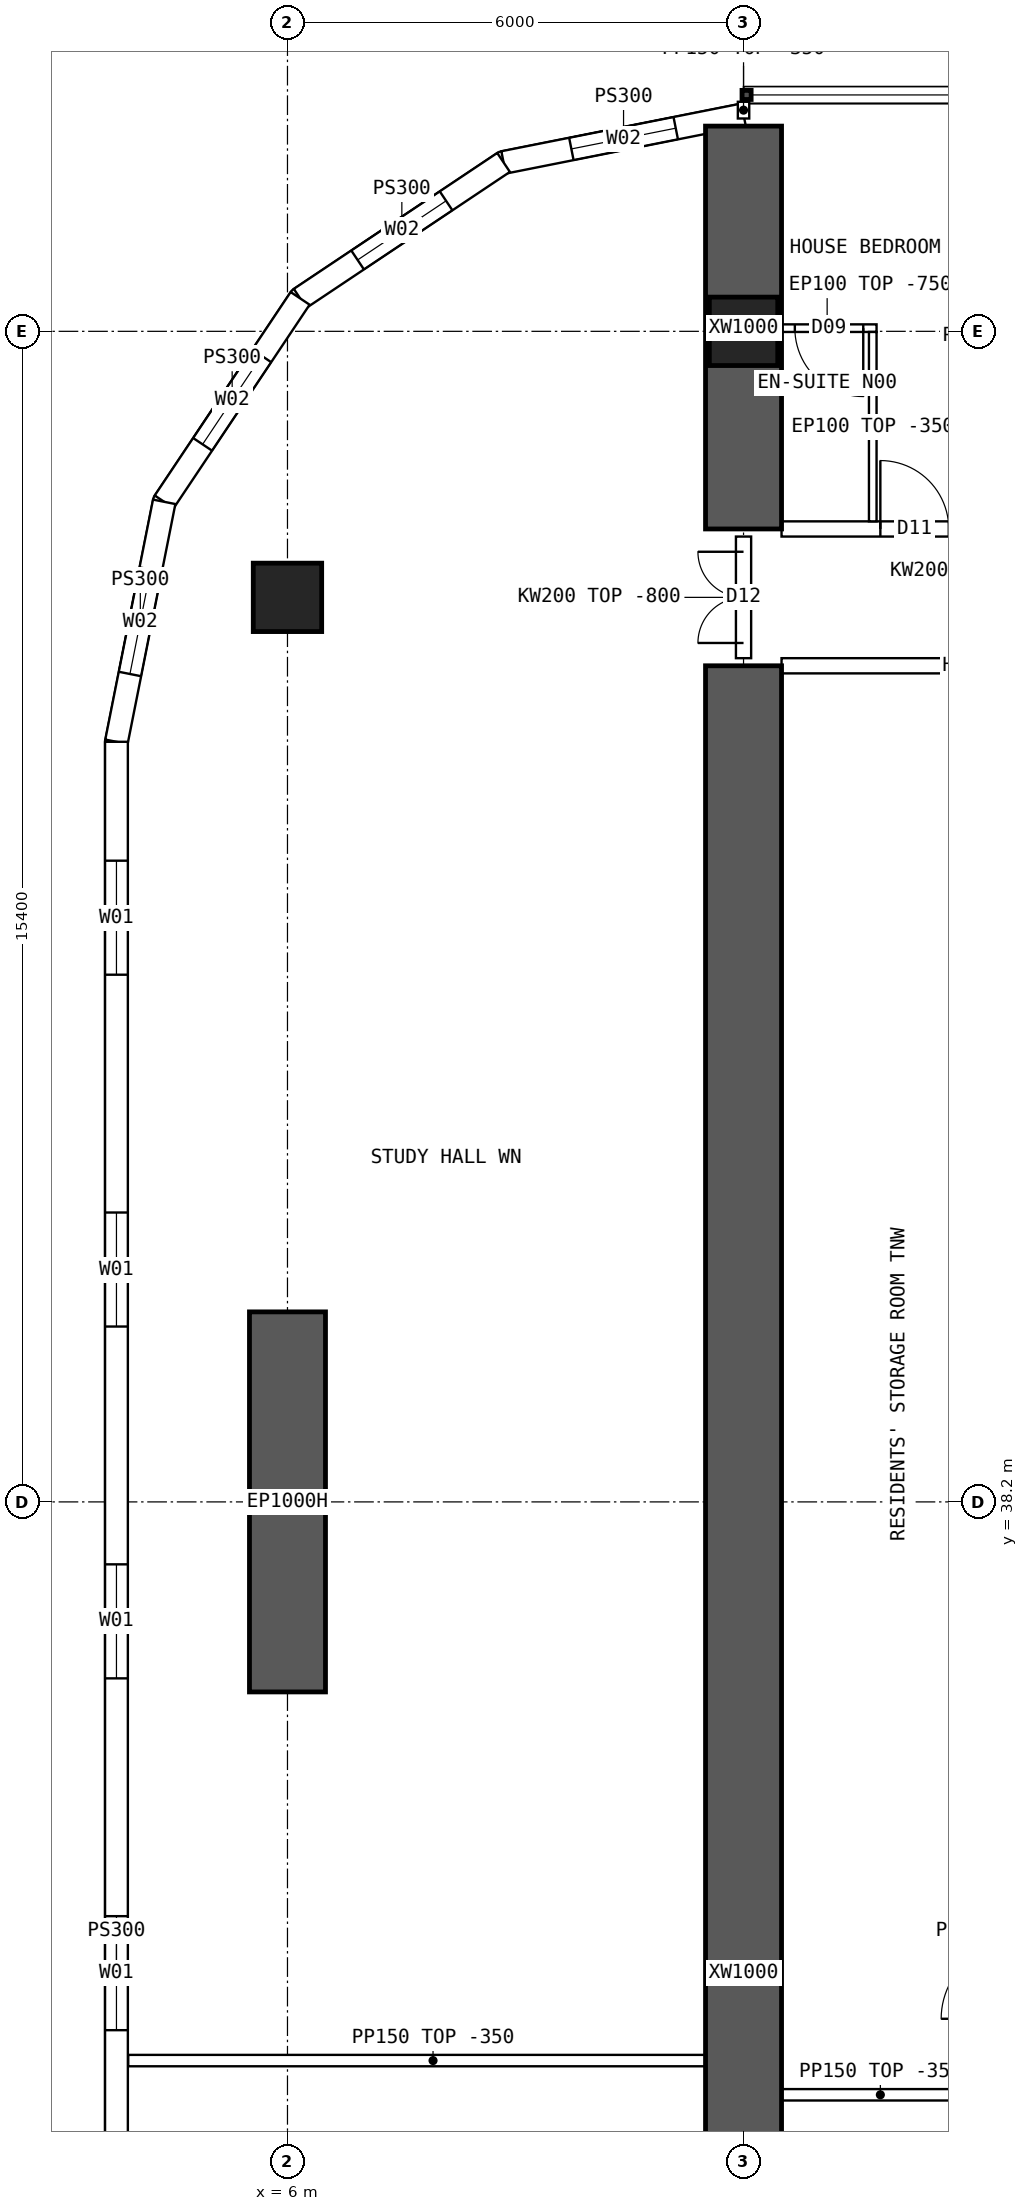
"""IFC4 building model, lengths in metres.
Left out: names, types, materials, properties, quantities, classifications, styles, units other than length and angle.
Written with IfcOpenShell. Run it as: python <this file> out.ifc"""

import sys

from ifc_helpers import new_model, si_unit, direction, frame, frame_2d, origin, origin_2d, place, context, subcontext, project, spatial, polyline, rectangle, hollow_rectangle, outline, extrude, element, fill, save


model = new_model("IFC4")
c1 = context("Model", 3, precision=1e-05, world=origin(), true_north=direction((0.0, 1.0)))
c2 = subcontext(c1, "Body", "Model", "MODEL_VIEW")
j1 = project(units=[si_unit("LENGTHUNIT", "METRE"), si_unit("PLANEANGLEUNIT", "RADIAN")], contexts=[c1])
p1 = place(None, origin())
s1 = spatial("IfcSite", under=j1, at=p1, CompositionType="ELEMENT")
p2 = place(p1, origin())
s2 = spatial("IfcBuilding", under=s1, at=p2, CompositionType="ELEMENT")
p3 = place(p2, frame((0.0, 0.0, 65.2)))
s3 = spatial("IfcBuildingStorey", under=s2, at=p3, CompositionType="ELEMENT", Elevation=65.2)
for number, where, z_axis, x_axis in (
    (1, (12.0, 53.6, 0.0), (0.0, 0.0, 1.0), (1.0, 0.0, 0.0)),
    (2, (6.0, 50.1, 0.0), (0.0, 0.0, 1.0), (1.0, 0.0, 0.0)),
):
    element("IfcColumn", number, at=place(p3, frame(where, z_axis=z_axis, x_axis=x_axis)), inside=s3, PredefinedType="COLUMN", context=c2, shape_type="SweptSolid", body=[
        extrude(hollow_rectangle(XDim=0.9, YDim=0.9, WallThickness=0.09, at=origin_2d()), origin(), (0.0, 0.0, 1.0), 3.75),
    ])
p4 = place(p3, frame((6.0, 35.7, 0.0), z_axis=(0.0, 0.0, 1.0), x_axis=(0.0, 1.0, 0.0)))
e3 = element("IfcWall", 3, at=p4, inside=s3, PredefinedType="SHEAR", context=c2, shape_type="SweptSolid", body=[
    extrude(rectangle(XDim=5.0, YDim=1.0, at=frame_2d((2.5, 0.0))), origin(), (0.0, 0.0, 1.0), 3.75),
])
p5 = place(p3, frame((12.0, 51.0, 0.0), z_axis=(0.0, 0.0, 1.0), x_axis=(0.0, 1.0, 0.0)))
e4 = element("IfcWall", 4, at=p5, inside=s3, PredefinedType="SHEAR", context=c2, shape_type="SweptSolid", body=[
    extrude(rectangle(XDim=5.3, YDim=1.0, at=frame_2d((2.65, 0.0))), origin(), (0.0, 0.0, 1.0), 3.75),
])
p6 = place(p3, frame((12.0, 14.8, 0.0), z_axis=(0.0, 0.0, 1.0), x_axis=(0.0, 1.0, 0.0)))
e5 = element("IfcWall", 5, at=p6, inside=s3, PredefinedType="SHEAR", context=c2, shape_type="SweptSolid", body=[
    extrude(rectangle(XDim=34.4, YDim=1.0, at=frame_2d((17.2, 0.0))), origin(), (0.0, 0.0, 1.0), 3.75),
])
p7 = place(p3, frame((3.75, 48.2, 0.0), z_axis=(0.0, 0.0, 1.0), x_axis=(0.0, -1.0, 0.0)))
e6 = element("IfcWall", 6, at=p7, inside=s3, PredefinedType="SOLIDWALL", context=c2, shape_type="SweptSolid", body=[
    extrude(outline(polyline([(-0.015, -0.15), (32.415, -0.15), (32.385, 0.15), (0.015, 0.15), (-0.015, -0.15)])), origin(), (0.0, 0.0, 1.0), 3.4),
])
p8 = place(p7, frame((1.564, 0.0, 0.9)))
e7 = element("IfcOpeningElement", 7, at=p8, cuts=e6, PredefinedType="OPENING", context=c2, shape_type="SweptSolid", body=[
    extrude(rectangle(XDim=1.5, YDim=2.0, at=frame_2d((0.75, 1.0))), frame((0.0, 0.16, 0.0), z_axis=(0.0, -1.0, 0.0), x_axis=(1.0, 0.0, 0.0)), (0.0, 0.0, 1.0), 0.32),
])
p9 = place(p7, frame((6.193, 0.0, 0.9)))
e8 = element("IfcOpeningElement", 8, at=p9, cuts=e6, PredefinedType="OPENING", context=c2, shape_type="SweptSolid", body=[
    extrude(rectangle(XDim=1.5, YDim=2.0, at=frame_2d((0.75, 1.0))), frame((0.0, 0.16, 0.0), z_axis=(0.0, -1.0, 0.0), x_axis=(1.0, 0.0, 0.0)), (0.0, 0.0, 1.0), 0.32),
])
p10 = place(p7, frame((10.822, 0.0, 0.9)))
e9 = element("IfcOpeningElement", 9, at=p10, cuts=e6, PredefinedType="OPENING", context=c2, shape_type="SweptSolid", body=[
    extrude(rectangle(XDim=1.5, YDim=2.0, at=frame_2d((0.75, 1.0))), frame((0.0, 0.16, 0.0), z_axis=(0.0, -1.0, 0.0), x_axis=(1.0, 0.0, 0.0)), (0.0, 0.0, 1.0), 0.32),
])
p11 = place(p7, frame((15.45, 0.0, 0.9)))
e10 = element("IfcOpeningElement", 10, at=p11, cuts=e6, PredefinedType="OPENING", context=c2, shape_type="SweptSolid", body=[
    extrude(rectangle(XDim=1.5, YDim=2.0, at=frame_2d((0.75, 1.0))), frame((0.0, 0.16, 0.0), z_axis=(0.0, -1.0, 0.0), x_axis=(1.0, 0.0, 0.0)), (0.0, 0.0, 1.0), 0.32),
])
p12 = place(p7, frame((20.079, 0.0, 0.9)))
e11 = element("IfcOpeningElement", 11, at=p12, cuts=e6, PredefinedType="OPENING", context=c2, shape_type="SweptSolid", body=[
    extrude(rectangle(XDim=1.5, YDim=2.0, at=frame_2d((0.75, 1.0))), frame((0.0, 0.16, 0.0), z_axis=(0.0, -1.0, 0.0), x_axis=(1.0, 0.0, 0.0)), (0.0, 0.0, 1.0), 0.32),
])
p13 = place(p7, frame((24.707, 0.0, 0.9)))
e12 = element("IfcOpeningElement", 12, at=p13, cuts=e6, PredefinedType="OPENING", context=c2, shape_type="SweptSolid", body=[
    extrude(rectangle(XDim=1.5, YDim=2.0, at=frame_2d((0.75, 1.0))), frame((0.0, 0.16, 0.0), z_axis=(0.0, -1.0, 0.0), x_axis=(1.0, 0.0, 0.0)), (0.0, 0.0, 1.0), 0.32),
])
p14 = place(p7, frame((29.336, 0.0, 0.9)))
e13 = element("IfcOpeningElement", 13, at=p14, cuts=e6, PredefinedType="OPENING", context=c2, shape_type="SweptSolid", body=[
    extrude(rectangle(XDim=1.5, YDim=2.0, at=frame_2d((0.75, 1.0))), frame((0.0, 0.16, 0.0), z_axis=(0.0, -1.0, 0.0), x_axis=(1.0, 0.0, 0.0)), (0.0, 0.0, 1.0), 0.32),
])
p15 = place(p3, frame((12.0, 56.45, 0.0), z_axis=(0.0, 0.0, 1.0), x_axis=(-0.980787251524, -0.195080412259, 0.0)))
e14 = element("IfcWall", 14, at=p15, inside=s3, PredefinedType="SOLIDWALL", context=c2, shape_type="SweptSolid", body=[
    extrude(outline(polyline([(-0.03, -0.15), (3.249, -0.15), (3.189, 0.15), (0.03, 0.15), (-0.03, -0.15)])), origin(), (0.0, 0.0, 1.0), 3.4),
])
p16 = place(p15, frame((0.909, 0.0, 0.9)))
e15 = element("IfcOpeningElement", 15, at=p16, cuts=e14, PredefinedType="OPENING", context=c2, shape_type="SweptSolid", body=[
    extrude(rectangle(XDim=1.4, YDim=1.8, at=frame_2d((0.7, 0.9))), frame((0.0, 0.16, 0.0), z_axis=(0.0, -1.0, 0.0), x_axis=(1.0, 0.0, 0.0)), (0.0, 0.0, 1.0), 0.32),
])
p17 = place(p3, frame((8.843, 55.822, 0.0), z_axis=(0.0, 0.0, 1.0), x_axis=(-0.831478105043, -0.555557522525, 0.0)))
e16 = element("IfcWall", 16, at=p17, inside=s3, PredefinedType="SOLIDWALL", context=c2, shape_type="SweptSolid", body=[
    extrude(outline(polyline([(-0.03, -0.15), (3.249, -0.15), (3.189, 0.15), (0.03, 0.15), (-0.03, -0.15)])), origin(), (0.0, 0.0, 1.0), 3.4),
])
p18 = place(p17, frame((0.909, 0.0, 0.9)))
e17 = element("IfcOpeningElement", 17, at=p18, cuts=e16, PredefinedType="OPENING", context=c2, shape_type="SweptSolid", body=[
    extrude(rectangle(XDim=1.4, YDim=1.8, at=frame_2d((0.7, 0.9))), frame((0.0, 0.16, 0.0), z_axis=(0.0, -1.0, 0.0), x_axis=(1.0, 0.0, 0.0)), (0.0, 0.0, 1.0), 0.32),
])
p19 = place(p3, frame((6.167, 54.034, 0.0), z_axis=(0.0, 0.0, 1.0), x_axis=(-0.555609954424, -0.831443069936, 0.0)))
e18 = element("IfcWall", 18, at=p19, inside=s3, PredefinedType="SOLIDWALL", context=c2, shape_type="SweptSolid", body=[
    extrude(outline(polyline([(-0.03, -0.15), (3.249, -0.15), (3.189, 0.15), (0.03, 0.15), (-0.03, -0.15)])), origin(), (0.0, 0.0, 1.0), 3.4),
])
p20 = place(p19, frame((0.909, 0.0, 0.9)))
e19 = element("IfcOpeningElement", 19, at=p20, cuts=e18, PredefinedType="OPENING", context=c2, shape_type="SweptSolid", body=[
    extrude(rectangle(XDim=1.4, YDim=1.8, at=frame_2d((0.7, 0.9))), frame((0.0, 0.16, 0.0), z_axis=(0.0, -1.0, 0.0), x_axis=(1.0, 0.0, 0.0)), (0.0, 0.0, 1.0), 0.32),
])
p21 = place(p3, frame((4.378, 51.357, 0.0), z_axis=(0.0, 0.0, 1.0), x_axis=(-0.195065901187, -0.980790137692, 0.0)))
e20 = element("IfcWall", 20, at=p21, inside=s3, PredefinedType="SOLIDWALL", context=c2, shape_type="SweptSolid", body=[
    extrude(outline(polyline([(-0.03, -0.15), (3.234, -0.15), (3.204, 0.15), (0.03, 0.15), (-0.03, -0.15)])), origin(), (0.0, 0.0, 1.0), 3.4),
])
p22 = place(p21, frame((0.909, 0.0, 0.9)))
e21 = element("IfcOpeningElement", 21, at=p22, cuts=e20, PredefinedType="OPENING", context=c2, shape_type="SweptSolid", body=[
    extrude(rectangle(XDim=1.4, YDim=1.8, at=frame_2d((0.7, 0.9))), frame((0.0, 0.16, 0.0), z_axis=(0.0, -1.0, 0.0), x_axis=(1.0, 0.0, 0.0)), (0.0, 0.0, 1.0), 0.32),
])
p23 = place(p3, frame((12.5, 51.0, 0.0), z_axis=(0.0, 0.0, 1.0), x_axis=(1.0, 0.0, 0.0)))
e22 = element("IfcWall", 22, at=p23, inside=s3, PredefinedType="SOLIDWALL", context=c2, shape_type="SweptSolid", body=[
    extrude(outline(polyline([(0.0, 0.0), (5.0, 0.0), (5.0, 3.0), (0.0, 3.0), (0.0, 0.0)])), frame((0.0, 0.1, 0.0), z_axis=(0.0, -1.0, 0.0), x_axis=(1.0, 0.0, 0.0)), (0.0, 0.0, 1.0), 0.2),
])
p24 = place(p23, frame((1.3, 0.0, 0.0)))
e23 = element("IfcOpeningElement", 23, at=p24, cuts=e22, PredefinedType="OPENING", context=c2, shape_type="SweptSolid", body=[
    extrude(rectangle(XDim=0.9, YDim=2.1, at=frame_2d((0.45, 1.05))), frame((0.0, 0.11, 0.0), z_axis=(0.0, -1.0, 0.0), x_axis=(1.0, 0.0, 0.0)), (0.0, 0.0, 1.0), 0.22),
])
p25 = place(p23, frame((2.675, 0.0, 0.0)))
e24 = element("IfcOpeningElement", 24, at=p25, cuts=e22, PredefinedType="OPENING", context=c2, shape_type="SweptSolid", body=[
    extrude(rectangle(XDim=0.9, YDim=2.1, at=frame_2d((0.45, 1.05))), frame((0.0, 0.11, 0.0), z_axis=(0.0, -1.0, 0.0), x_axis=(1.0, 0.0, 0.0)), (0.0, 0.0, 1.0), 0.22),
])
p26 = place(p3, frame((12.5, 49.2, 0.0), z_axis=(0.0, 0.0, 1.0), x_axis=(1.0, 0.0, 0.0)))
e25 = element("IfcWall", 25, at=p26, inside=s3, PredefinedType="SOLIDWALL", context=c2, shape_type="SweptSolid", body=[
    extrude(rectangle(XDim=5.0, YDim=0.2, at=frame_2d((2.5, 0.0))), origin(), (0.0, 0.0, 1.0), 3.4),
])
p27 = place(p26, frame((3.3, 0.0, 0.0)))
e26 = element("IfcOpeningElement", 26, at=p27, cuts=e25, PredefinedType="OPENING", context=c2, shape_type="SweptSolid", body=[
    extrude(rectangle(XDim=1.6, YDim=2.1, at=frame_2d((0.8, 1.05))), frame((0.0, 0.11, 0.0), z_axis=(0.0, -1.0, 0.0), x_axis=(1.0, 0.0, 0.0)), (0.0, 0.0, 1.0), 0.22),
])
p28 = place(p3, frame((12.45, 53.642, 0.0), z_axis=(0.0, 0.0, 1.0), x_axis=(1.0, 0.0, 0.0)))
e27 = element("IfcWall", 27, at=p28, inside=s3, PredefinedType="PARTITIONING", context=c2, shape_type="SweptSolid", body=[
    extrude(outline(polyline([(0.0, 0.0), (1.3, 0.0), (1.3, 3.0), (0.0, 3.0), (0.0, 0.0)])), frame((0.0, 0.05, 0.0), z_axis=(0.0, -1.0, 0.0), x_axis=(1.0, 0.0, 0.0)), (0.0, 0.0, 1.0), 0.1),
])
p29 = place(p28, frame((0.225, 0.0, 0.0)))
e28 = element("IfcOpeningElement", 28, at=p29, cuts=e27, PredefinedType="OPENING", context=c2, shape_type="SweptSolid", body=[
    extrude(rectangle(XDim=0.9, YDim=2.1, at=frame_2d((0.45, 1.05))), frame((0.0, 0.06, 0.0), z_axis=(0.0, -1.0, 0.0), x_axis=(1.0, 0.0, 0.0)), (0.0, 0.0, 1.0), 0.12),
])
p30 = place(p3, frame((13.7, 53.592, 0.0), z_axis=(0.0, 0.0, 1.0), x_axis=(0.0, -1.0, 0.0)))
e29 = element("IfcWall", 29, at=p30, inside=s3, PredefinedType="PARTITIONING", context=c2, shape_type="SweptSolid", body=[
    extrude(outline(polyline([(0.0, 0.0), (2.492, 0.0), (2.492, 3.0), (2.444, 3.0), (2.442, 3.4), (0.194, 3.4), (0.192, 3.0), (0.0, 3.0), (0.0, 0.0)])), frame((0.0, 0.05, 0.0), z_axis=(0.0, -1.0, 0.0), x_axis=(1.0, 0.0, 0.0)), (0.0, 0.0, 1.0), 0.1),
])
p31 = place(p3, frame((12.0, 30.4, 0.0), z_axis=(0.0, 0.0, 1.0), x_axis=(1.0, 0.0, 0.0)))
e30 = element("IfcWall", 30, at=p31, inside=s3, PredefinedType="PARTITIONING", context=c2, shape_type="SweptSolid", body=[
    extrude(rectangle(XDim=3.6, YDim=0.15, at=frame_2d((1.8, 0.0))), origin(), (0.0, 0.0, 1.0), 3.4),
])
p32 = place(p3, frame((3.905, 30.85, 0.0), z_axis=(0.0, 0.0, 1.0), x_axis=(1.0, 0.0, 0.0)))
e31 = element("IfcWall", 31, at=p32, inside=s3, PredefinedType="PARTITIONING", context=c2, shape_type="SweptSolid", body=[
    extrude(outline(polyline([(0.0, 0.0), (8.02, 0.0), (8.02, 3.4), (2.397, 3.4), (2.395, 2.95), (1.797, 2.95), (1.795, 3.4), (0.0, 3.4), (0.0, 0.0)])), frame((0.0, 0.075, 0.0), z_axis=(0.0, -1.0, 0.0), x_axis=(1.0, 0.0, 0.0)), (0.0, 0.0, 1.0), 0.15),
])
p33 = place(p3, frame((12.0, 49.3, 0.0), z_axis=(0.0, 0.0, 1.0), x_axis=(0.0, 1.0, 0.0)))
e32 = element("IfcWall", 32, at=p33, inside=s3, PredefinedType="SOLIDWALL", context=c2, shape_type="SweptSolid", body=[
    extrude(outline(polyline([(0.0, 0.0), (1.6, 0.0), (1.6, 2.95), (0.0, 2.95), (0.0, 0.0)])), frame((0.0, 0.1, 0.0), z_axis=(0.0, -1.0, 0.0), x_axis=(1.0, 0.0, 0.0)), (0.0, 0.0, 1.0), 0.2),
])
p34 = place(p33, frame((0.2, 0.0, 0.0)))
e33 = element("IfcOpeningElement", 33, at=p34, cuts=e32, PredefinedType="OPENING", context=c2, shape_type="SweptSolid", body=[
    extrude(rectangle(XDim=1.2, YDim=2.1, at=frame_2d((0.6, 1.05))), frame((0.0, 0.11, 0.0), z_axis=(0.0, -1.0, 0.0), x_axis=(1.0, 0.0, 0.0)), (0.0, 0.0, 1.0), 0.22),
])
p35 = place(p3, frame((12.0, 56.4, 0.0), z_axis=(0.0, 0.0, 1.0), x_axis=(0.0, 1.0, 0.0)))
e34 = element("IfcWall", 34, at=p35, inside=s3, PredefinedType="PARTITIONING", context=c2, shape_type="SweptSolid", body=[
    extrude(rectangle(XDim=0.22, YDim=0.15, at=frame_2d((0.11, 0.0))), origin(), (0.0, 0.0, 1.0), 3.4),
])
p36 = place(p8, origin())
e35 = element("IfcWindow", 35, at=p36, inside=s3, PartitioningType="SINGLE_PANEL", PredefinedType="WINDOW", context=c2, shape_type="SweptSolid", body=[
    extrude(rectangle(XDim=1.5, YDim=2.0, at=frame_2d((0.75, 1.0))), frame((0.0, 0.03, 0.0), z_axis=(0.0, -1.0, 0.0), x_axis=(1.0, 0.0, 0.0)), (0.0, 0.0, 1.0), 0.06),
])
fill(e7, e35)
p37 = place(p9, origin())
e36 = element("IfcWindow", 36, at=p37, inside=s3, PartitioningType="SINGLE_PANEL", PredefinedType="WINDOW", context=c2, shape_type="SweptSolid", body=[
    extrude(rectangle(XDim=1.5, YDim=2.0, at=frame_2d((0.75, 1.0))), frame((0.0, 0.03, 0.0), z_axis=(0.0, -1.0, 0.0), x_axis=(1.0, 0.0, 0.0)), (0.0, 0.0, 1.0), 0.06),
])
fill(e8, e36)
p38 = place(p10, origin())
e37 = element("IfcWindow", 37, at=p38, inside=s3, PartitioningType="SINGLE_PANEL", PredefinedType="WINDOW", context=c2, shape_type="SweptSolid", body=[
    extrude(rectangle(XDim=1.5, YDim=2.0, at=frame_2d((0.75, 1.0))), frame((0.0, 0.03, 0.0), z_axis=(0.0, -1.0, 0.0), x_axis=(1.0, 0.0, 0.0)), (0.0, 0.0, 1.0), 0.06),
])
fill(e9, e37)
p39 = place(p11, origin())
e38 = element("IfcWindow", 38, at=p39, inside=s3, PartitioningType="SINGLE_PANEL", PredefinedType="WINDOW", context=c2, shape_type="SweptSolid", body=[
    extrude(rectangle(XDim=1.5, YDim=2.0, at=frame_2d((0.75, 1.0))), frame((0.0, 0.03, 0.0), z_axis=(0.0, -1.0, 0.0), x_axis=(1.0, 0.0, 0.0)), (0.0, 0.0, 1.0), 0.06),
])
fill(e10, e38)
p40 = place(p16, origin())
e39 = element("IfcWindow", 39, at=p40, inside=s3, PartitioningType="SINGLE_PANEL", PredefinedType="WINDOW", context=c2, shape_type="SweptSolid", body=[
    extrude(rectangle(XDim=1.4, YDim=1.8, at=frame_2d((0.7, 0.9))), frame((0.0, 0.03, 0.0), z_axis=(0.0, -1.0, 0.0), x_axis=(1.0, 0.0, 0.0)), (0.0, 0.0, 1.0), 0.06),
])
fill(e15, e39)
p41 = place(p18, origin())
e40 = element("IfcWindow", 40, at=p41, inside=s3, PartitioningType="SINGLE_PANEL", PredefinedType="WINDOW", context=c2, shape_type="SweptSolid", body=[
    extrude(rectangle(XDim=1.4, YDim=1.8, at=frame_2d((0.7, 0.9))), frame((0.0, 0.03, 0.0), z_axis=(0.0, -1.0, 0.0), x_axis=(1.0, 0.0, 0.0)), (0.0, 0.0, 1.0), 0.06),
])
fill(e17, e40)
p42 = place(p20, origin())
e41 = element("IfcWindow", 41, at=p42, inside=s3, PartitioningType="SINGLE_PANEL", PredefinedType="WINDOW", context=c2, shape_type="SweptSolid", body=[
    extrude(rectangle(XDim=1.4, YDim=1.8, at=frame_2d((0.7, 0.9))), frame((0.0, 0.03, 0.0), z_axis=(0.0, -1.0, 0.0), x_axis=(1.0, 0.0, 0.0)), (0.0, 0.0, 1.0), 0.06),
])
fill(e19, e41)
p43 = place(p22, origin())
e42 = element("IfcWindow", 42, at=p43, inside=s3, PartitioningType="SINGLE_PANEL", PredefinedType="WINDOW", context=c2, shape_type="SweptSolid", body=[
    extrude(rectangle(XDim=1.4, YDim=1.8, at=frame_2d((0.7, 0.9))), frame((0.0, 0.03, 0.0), z_axis=(0.0, -1.0, 0.0), x_axis=(1.0, 0.0, 0.0)), (0.0, 0.0, 1.0), 0.06),
])
fill(e21, e42)
p44 = place(p29, origin())
e43 = element("IfcDoor", 43, at=p44, inside=s3, OperationType="SINGLE_SWING_RIGHT", PredefinedType="DOOR", context=c2, shape_type="SweptSolid", body=[
    extrude(rectangle(XDim=0.9, YDim=2.1, at=frame_2d((0.45, 1.05))), frame((0.0, 0.025, 0.0), z_axis=(0.0, -1.0, 0.0), x_axis=(1.0, 0.0, 0.0)), (0.0, 0.0, 1.0), 0.05),
])
fill(e28, e43)
p45 = place(p24, origin())
e44 = element("IfcDoor", 44, at=p45, inside=s3, OperationType="SINGLE_SWING_LEFT", PredefinedType="DOOR", context=c2, shape_type="SweptSolid", body=[
    extrude(rectangle(XDim=0.9, YDim=2.1, at=frame_2d((0.45, 1.05))), frame((0.0, 0.025, 0.0), z_axis=(0.0, -1.0, 0.0), x_axis=(1.0, 0.0, 0.0)), (0.0, 0.0, 1.0), 0.05),
])
fill(e23, e44)
p46 = place(p34, origin())
e45 = element("IfcDoor", 45, at=p46, inside=s3, OperationType="DOUBLE_DOOR_SINGLE_SWING", PredefinedType="DOOR", context=c2, shape_type="SweptSolid", body=[
    extrude(rectangle(XDim=1.2, YDim=2.1, at=frame_2d((0.6, 1.05))), frame((0.0, 0.025, 0.0), z_axis=(0.0, -1.0, 0.0), x_axis=(1.0, 0.0, 0.0)), (0.0, 0.0, 1.0), 0.05),
])
fill(e33, e45)
save(model, sys.argv[1])
